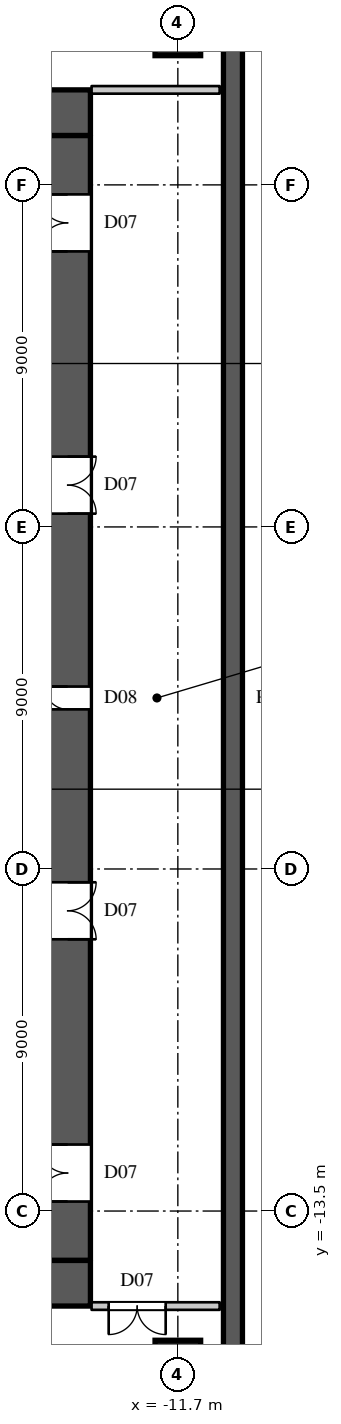
"""IFC4 building model, lengths in metres.
Left out: names, types, materials, properties, quantities, classifications, styles, units other than length and angle.
Written with IfcOpenShell. Run it as: python <this file> out.ifc"""

import sys

from ifc_helpers import new_model, si_unit, direction, frame, frame_2d, origin, origin_2d, place, context, subcontext, project, spatial, rectangle, circle, extrude, element, fill, save


model = new_model("IFC4")
c1 = context("Model", 3, precision=1e-05, world=origin(), true_north=direction((0.0, 1.0)))
c2 = subcontext(c1, "Body", "Model", "MODEL_VIEW")
j1 = project(units=[si_unit("LENGTHUNIT", "METRE"), si_unit("PLANEANGLEUNIT", "RADIAN")], contexts=[c1])
p1 = place(None, origin())
s1 = spatial("IfcSite", under=j1, at=p1, CompositionType="ELEMENT")
p2 = place(p1, origin())
s2 = spatial("IfcBuilding", under=s1, at=p2, CompositionType="ELEMENT")
p3 = place(p2, frame((0.0, 0.0, 9.0)))
s3 = spatial("IfcBuildingStorey", under=s2, at=p3, CompositionType="ELEMENT", Elevation=9.0)
p4 = place(p3, frame((-10.25, -19.5, 0.0), z_axis=(0.0, 0.0, 1.0), x_axis=(0.0, 1.0, 0.0)))
e1 = element("IfcWall", 1, at=p4, inside=s3, PredefinedType="SOLIDWALL", context=c2, shape_type="SweptSolid", body=[
    extrude(rectangle(XDim=39.0, YDim=0.5, at=frame_2d((19.5, 0.0))), origin(), (0.0, 0.0, 1.0), 10.0),
])
for number, where, z_axis, x_axis in (
    (2, (-11.7, -17.5, 0.0), (0.0, 0.0, 1.0), (1.0, 0.0, 0.0)),
    (3, (-11.7, 17.5, 0.0), (0.0, 0.0, 1.0), (1.0, 0.0, 0.0)),
):
    element("IfcColumn", number, at=place(p3, frame(where, z_axis=z_axis, x_axis=x_axis)), inside=s3, PredefinedType="COLUMN", context=c2, shape_type="SweptSolid", body=[
        extrude(circle(Radius=0.6, at=origin_2d()), origin(), (0.0, 0.0, 1.0), 10.0),
    ])
for number, where, z_axis, x_axis in (
    (4, (-30.0, 15.4, 0.0), (0.0, 0.0, 1.0), (1.0, 0.0, 0.0)),
    (5, (-30.0, -15.4, 0.0), (0.0, 0.0, 1.0), (1.0, 0.0, 0.0)),
):
    element("IfcWall", number, at=place(p3, frame(where, z_axis=z_axis, x_axis=x_axis)), inside=s3, PredefinedType="SHEAR", context=c2, shape_type="SweptSolid", body=[
        extrude(rectangle(XDim=16.0, YDim=1.2, at=frame_2d((8.0, 0.0))), origin(), (0.0, 0.0, 1.0), 10.0),
    ])
p5 = place(p3, frame((-14.6, -14.8, 0.0), z_axis=(0.0, 0.0, 1.0), x_axis=(0.0, 1.0, 0.0)))
e6 = element("IfcWall", 6, at=p5, inside=s3, PredefinedType="SHEAR", context=c2, shape_type="SweptSolid", body=[
    extrude(rectangle(XDim=29.6, YDim=1.2, at=frame_2d((14.8, 0.0))), origin(), (0.0, 0.0, 1.0), 10.0),
])
p6 = place(p5, frame((1.55, 0.0, 0.0)))
e7 = element("IfcOpeningElement", 7, at=p6, cuts=e6, PredefinedType="OPENING", context=c2, shape_type="SweptSolid", body=[
    extrude(rectangle(XDim=1.5, YDim=2.4, at=frame_2d((0.75, 1.2))), frame((0.0, 0.61, 0.0), z_axis=(0.0, -1.0, 0.0), x_axis=(1.0, 0.0, 0.0)), (0.0, 0.0, 1.0), 1.22),
])
p7 = place(p5, frame((26.55, 0.0, 0.0)))
e8 = element("IfcOpeningElement", 8, at=p7, cuts=e6, PredefinedType="OPENING", context=c2, shape_type="SweptSolid", body=[
    extrude(rectangle(XDim=1.5, YDim=2.4, at=frame_2d((0.75, 1.2))), frame((0.0, 0.61, 0.0), z_axis=(0.0, -1.0, 0.0), x_axis=(1.0, 0.0, 0.0)), (0.0, 0.0, 1.0), 1.22),
])
p8 = place(p5, frame((8.45, 0.0, 0.0)))
e9 = element("IfcOpeningElement", 9, at=p8, cuts=e6, PredefinedType="OPENING", context=c2, shape_type="SweptSolid", body=[
    extrude(rectangle(XDim=1.5, YDim=2.4, at=frame_2d((0.75, 1.2))), frame((0.0, 0.61, 0.0), z_axis=(0.0, -1.0, 0.0), x_axis=(1.0, 0.0, 0.0)), (0.0, 0.0, 1.0), 1.22),
])
p9 = place(p5, frame((19.65, 0.0, 0.0)))
e10 = element("IfcOpeningElement", 10, at=p9, cuts=e6, PredefinedType="OPENING", context=c2, shape_type="SweptSolid", body=[
    extrude(rectangle(XDim=1.5, YDim=2.4, at=frame_2d((0.75, 1.2))), frame((0.0, 0.61, 0.0), z_axis=(0.0, -1.0, 0.0), x_axis=(1.0, 0.0, 0.0)), (0.0, 0.0, 1.0), 1.22),
])
p10 = place(p5, frame((14.5, 0.0, 0.0)))
e11 = element("IfcOpeningElement", 11, at=p10, cuts=e6, PredefinedType="OPENING", context=c2, shape_type="SweptSolid", body=[
    extrude(rectangle(XDim=0.6, YDim=2.0, at=frame_2d((0.3, 1.0))), frame((0.0, 0.61, 0.0), z_axis=(0.0, -1.0, 0.0), x_axis=(1.0, 0.0, 0.0)), (0.0, 0.0, 1.0), 1.22),
])
p11 = place(p3, frame((-13.97, -16.0, 0.0), z_axis=(0.0, 0.0, 1.0), x_axis=(1.0, 0.0, 0.0)))
e12 = element("IfcWall", 12, at=p11, inside=s3, PredefinedType="PARTITIONING", context=c2, shape_type="SweptSolid", body=[
    extrude(rectangle(XDim=3.37, YDim=0.2, at=frame_2d((1.685, 0.0))), origin(), (0.0, 0.0, 1.0), 9.598),
])
p12 = place(p11, frame((0.45, 0.0, 0.0)))
e13 = element("IfcOpeningElement", 13, at=p12, cuts=e12, PredefinedType="OPENING", context=c2, shape_type="SweptSolid", body=[
    extrude(rectangle(XDim=1.5, YDim=2.4, at=frame_2d((0.75, 1.2))), frame((0.0, 0.11, 0.0), z_axis=(0.0, -1.0, 0.0), x_axis=(1.0, 0.0, 0.0)), (0.0, 0.0, 1.0), 0.22),
])
p13 = place(p3, frame((-13.97, 16.0, 0.0), z_axis=(0.0, 0.0, 1.0), x_axis=(1.0, 0.0, 0.0)))
e14 = element("IfcWall", 14, at=p13, inside=s3, PredefinedType="PARTITIONING", context=c2, shape_type="SweptSolid", body=[
    extrude(rectangle(XDim=3.37, YDim=0.2, at=frame_2d((1.685, 0.0))), origin(), (0.0, 0.0, 1.0), 9.598),
])
p14 = place(p12, origin())
e15 = element("IfcDoor", 15, at=p14, inside=s3, OperationType="DOUBLE_DOOR_SINGLE_SWING", PredefinedType="DOOR", context=c2, shape_type="SweptSolid", body=[
    extrude(rectangle(XDim=1.5, YDim=2.4, at=frame_2d((0.75, 1.2))), frame((0.0, 0.025, 0.0), z_axis=(0.0, -1.0, 0.0), x_axis=(1.0, 0.0, 0.0)), (0.0, 0.0, 1.0), 0.05),
])
fill(e13, e15)
p15 = place(p6, origin())
e16 = element("IfcDoor", 16, at=p15, inside=s3, OperationType="DOUBLE_DOOR_SINGLE_SWING", PredefinedType="DOOR", context=c2, shape_type="SweptSolid", body=[
    extrude(rectangle(XDim=1.5, YDim=2.4, at=frame_2d((0.75, 1.2))), frame((0.0, 0.025, 0.0), z_axis=(0.0, -1.0, 0.0), x_axis=(1.0, 0.0, 0.0)), (0.0, 0.0, 1.0), 0.05),
])
fill(e7, e16)
p16 = place(p7, origin())
e17 = element("IfcDoor", 17, at=p16, inside=s3, OperationType="DOUBLE_DOOR_SINGLE_SWING", PredefinedType="DOOR", context=c2, shape_type="SweptSolid", body=[
    extrude(rectangle(XDim=1.5, YDim=2.4, at=frame_2d((0.75, 1.2))), frame((0.0, 0.025, 0.0), z_axis=(0.0, -1.0, 0.0), x_axis=(1.0, 0.0, 0.0)), (0.0, 0.0, 1.0), 0.05),
])
fill(e8, e17)
p17 = place(p8, origin())
e18 = element("IfcDoor", 18, at=p17, inside=s3, OperationType="DOUBLE_DOOR_SINGLE_SWING", PredefinedType="DOOR", context=c2, shape_type="SweptSolid", body=[
    extrude(rectangle(XDim=1.5, YDim=2.4, at=frame_2d((0.75, 1.2))), frame((0.0, 0.025, 0.0), z_axis=(0.0, -1.0, 0.0), x_axis=(1.0, 0.0, 0.0)), (0.0, 0.0, 1.0), 0.05),
])
fill(e9, e18)
p18 = place(p9, origin())
e19 = element("IfcDoor", 19, at=p18, inside=s3, OperationType="DOUBLE_DOOR_SINGLE_SWING", PredefinedType="DOOR", context=c2, shape_type="SweptSolid", body=[
    extrude(rectangle(XDim=1.5, YDim=2.4, at=frame_2d((0.75, 1.2))), frame((0.0, 0.025, 0.0), z_axis=(0.0, -1.0, 0.0), x_axis=(1.0, 0.0, 0.0)), (0.0, 0.0, 1.0), 0.05),
])
fill(e10, e19)
p19 = place(p10, origin())
e20 = element("IfcDoor", 20, at=p19, inside=s3, OperationType="SINGLE_SWING_RIGHT", PredefinedType="DOOR", context=c2, shape_type="SweptSolid", body=[
    extrude(rectangle(XDim=0.6, YDim=2.0, at=frame_2d((0.3, 1.0))), frame((0.0, 0.025, 0.0), z_axis=(0.0, -1.0, 0.0), x_axis=(1.0, 0.0, 0.0)), (0.0, 0.0, 1.0), 0.05),
])
fill(e11, e20)
save(model, sys.argv[1])
